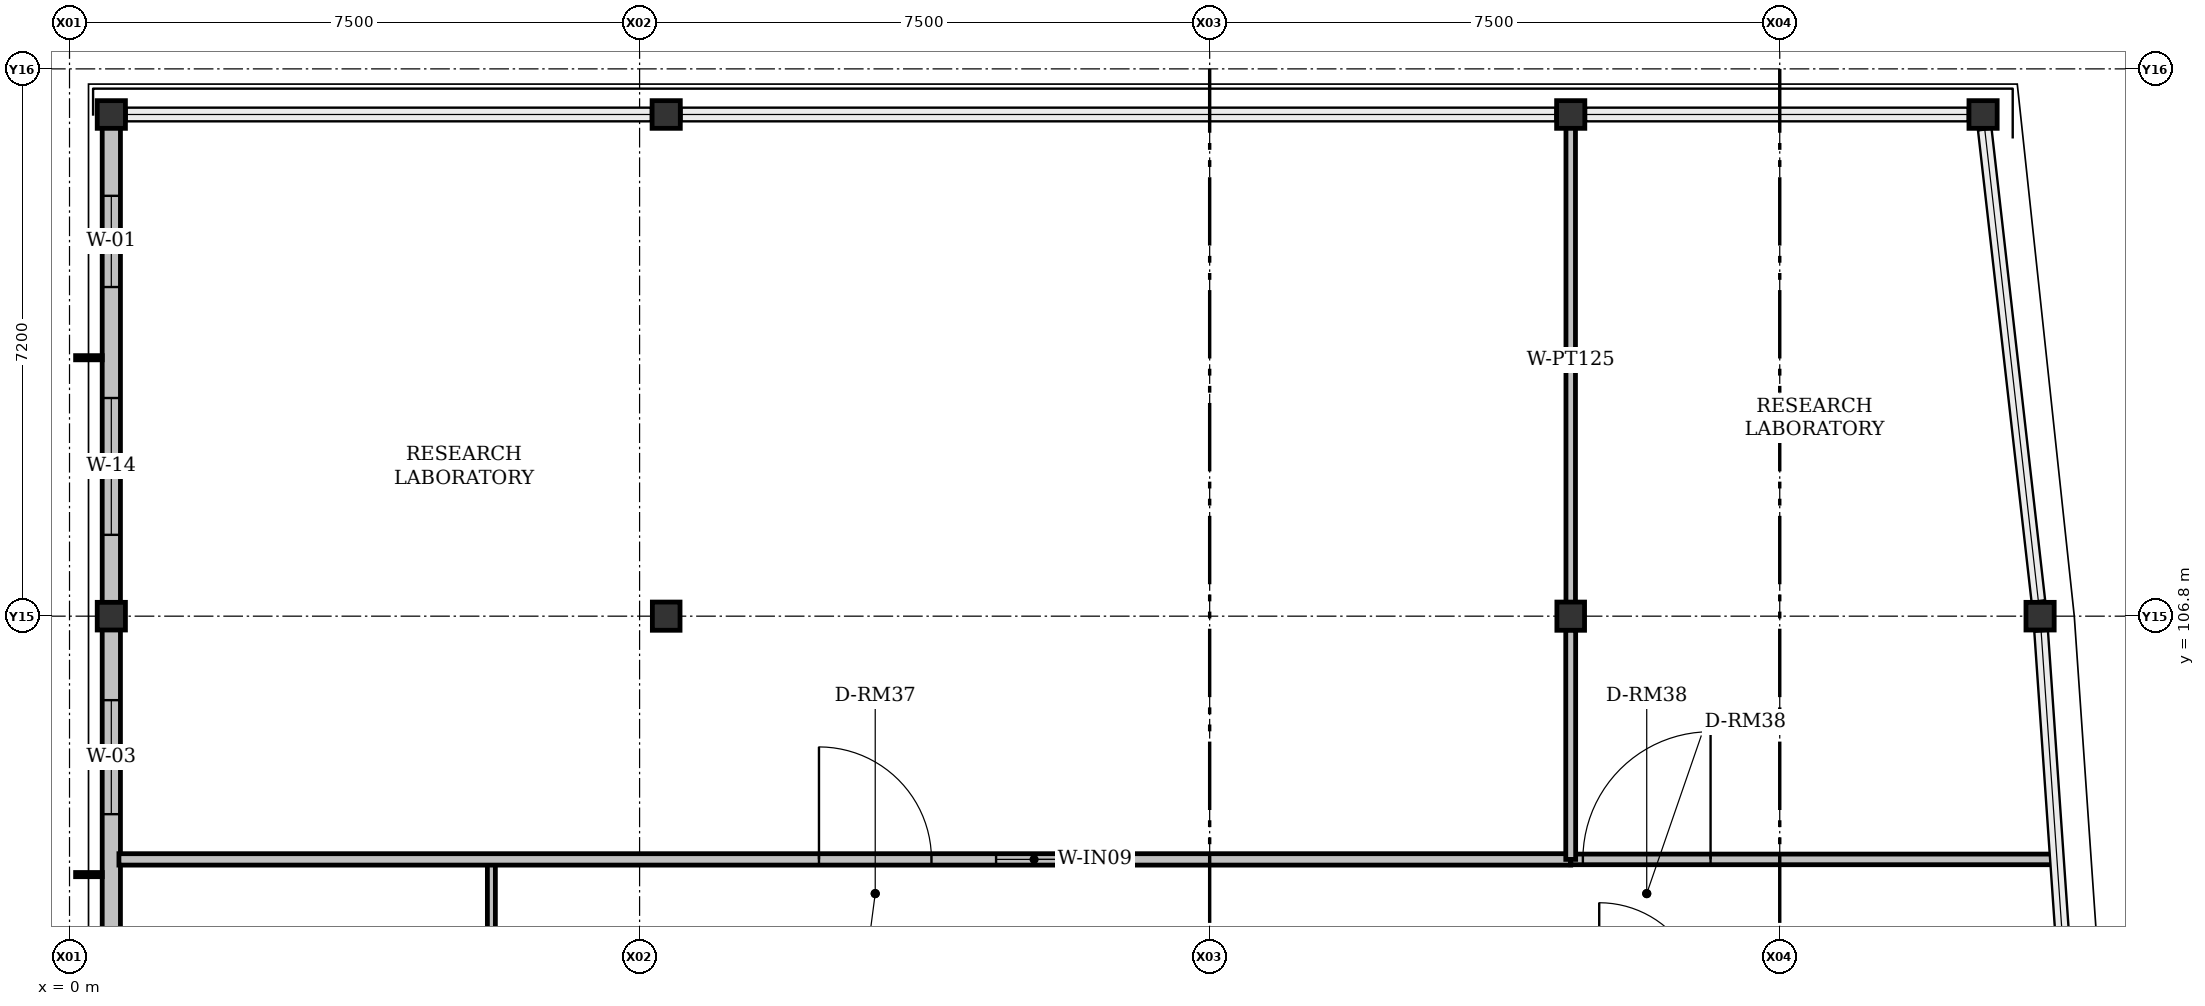
"""IFC4 building model, lengths in metres.
Left out: names, types, materials, properties, quantities, classifications, styles, units other than length and angle.
Written with IfcOpenShell. Run it as: python <this file> out.ifc"""

import sys

from ifc_helpers import new_model, si_unit, direction, frame, frame_2d, origin, origin_2d, place, context, subcontext, project, spatial, rectangle, i_section, extrude, element, fill, save


model = new_model("IFC4")
c1 = context("Model", 3, precision=1e-05, world=origin(), true_north=direction((0.0, 1.0)))
c2 = subcontext(c1, "Body", "Model", "MODEL_VIEW")
j1 = project(units=[si_unit("LENGTHUNIT", "METRE"), si_unit("PLANEANGLEUNIT", "RADIAN")], contexts=[c1])
p1 = place(None, origin())
s1 = spatial("IfcSite", under=j1, at=p1, CompositionType="ELEMENT")
p2 = place(p1, origin())
s2 = spatial("IfcBuilding", under=s1, at=p2, CompositionType="ELEMENT")
p3 = place(p2, frame((0.0, 0.0, 35.1)))
s3 = spatial("IfcBuildingStorey", under=s2, at=p3, CompositionType="ELEMENT", Elevation=35.1)
for number, where, z_axis, x_axis in (
    (1, (0.55, 106.8, 0.0), (0.0, 0.0, 1.0), (1.0, 0.0, 0.0)),
    (2, (7.85, 106.8, 0.0), (0.0, 0.0, 1.0), (0.0, 1.0, 0.0)),
    (3, (19.75, 106.8, 0.0), (0.0, 0.0, 1.0), (0.0, 1.0, 0.0)),
    (4, (25.925, 106.8, 0.0), (0.0, 0.0, 1.0), (1.0, 0.0, 0.0)),
    (5, (0.55, 113.4, 0.0), (0.0, 0.0, 1.0), (1.0, 0.0, 0.0)),
    (6, (7.85, 113.4, 0.0), (0.0, 0.0, 1.0), (1.0, 0.0, 0.0)),
    (7, (19.75, 113.4, 0.0), (0.0, 0.0, 1.0), (1.0, 0.0, 0.0)),
    (8, (25.175, 113.4, 0.0), (0.0, 0.0, 1.0), (1.0, 0.0, 0.0)),
):
    element("IfcColumn", number, at=place(p3, frame(where, z_axis=z_axis, x_axis=x_axis)), inside=s3, PredefinedType="COLUMN", context=c2, shape_type="SweptSolid", body=[
        extrude(i_section(OverallWidth=0.371, OverallDepth=0.364, WebThickness=0.013, FlangeThickness=0.022, FilletRadius=0.015, at=origin_2d()), origin(), (0.0, 0.0, 1.0), 4.2),
    ])
p4 = place(p3, frame((0.55, 99.6, 0.0), z_axis=(0.0, 0.0, 1.0), x_axis=(0.0, 1.0, 0.0)))
e9 = element("IfcWall", 9, at=p4, inside=s3, PredefinedType="SOLIDWALL", context=c2, shape_type="SweptSolid", body=[
    extrude(rectangle(XDim=7.2, YDim=0.24, at=frame_2d((3.6, 0.0))), origin(), (0.0, 0.0, 1.0), 3.577),
])
p5 = place(p4, frame((1.505, 0.0, 0.92)))
e10 = element("IfcOpeningElement", 10, at=p5, cuts=e9, PredefinedType="OPENING", context=c2, shape_type="SweptSolid", body=[
    extrude(rectangle(XDim=1.5, YDim=1.7, at=frame_2d((0.75, 0.85))), frame((0.0, 0.12, 0.0), z_axis=(0.0, -1.0, 0.0), x_axis=(1.0, 0.0, 0.0)), (0.0, 0.0, 1.0), 0.24),
])
p6 = place(p4, frame((4.595, 0.0, 0.92)))
e11 = element("IfcOpeningElement", 11, at=p6, cuts=e9, PredefinedType="OPENING", context=c2, shape_type="SweptSolid", body=[
    extrude(rectangle(XDim=1.5, YDim=1.4, at=frame_2d((0.75, 0.7))), frame((0.0, 0.12, 0.0), z_axis=(0.0, -1.0, 0.0), x_axis=(1.0, 0.0, 0.0)), (0.0, 0.0, 1.0), 0.24),
])
p7 = place(p3, frame((0.55, 106.8, 0.0), z_axis=(0.0, 0.0, 1.0), x_axis=(0.0, 1.0, 0.0)))
e12 = element("IfcWall", 12, at=p7, inside=s3, PredefinedType="SOLIDWALL", context=c2, shape_type="SweptSolid", body=[
    extrude(rectangle(XDim=6.6, YDim=0.24, at=frame_2d((3.3, 0.0))), origin(), (0.0, 0.0, 1.0), 3.577),
])
p8 = place(p7, frame((1.07, 0.0, 0.92)))
e13 = element("IfcOpeningElement", 13, at=p8, cuts=e12, PredefinedType="OPENING", context=c2, shape_type="SweptSolid", body=[
    extrude(rectangle(XDim=1.8, YDim=1.7, at=frame_2d((0.9, 0.85))), frame((0.0, 0.12, 0.0), z_axis=(0.0, -1.0, 0.0), x_axis=(1.0, 0.0, 0.0)), (0.0, 0.0, 1.0), 0.24),
])
p9 = place(p7, frame((4.33, 0.0, 0.92)))
e14 = element("IfcOpeningElement", 14, at=p9, cuts=e12, PredefinedType="OPENING", context=c2, shape_type="SweptSolid", body=[
    extrude(rectangle(XDim=1.2, YDim=1.4, at=frame_2d((0.6, 0.7))), frame((0.0, 0.12, 0.0), z_axis=(0.0, -1.0, 0.0), x_axis=(1.0, 0.0, 0.0)), (0.0, 0.0, 1.0), 0.24),
])
p10 = place(p3, frame((5.55, 85.2, 0.0), z_axis=(0.0, 0.0, 1.0), x_axis=(0.0, 1.0, 0.0)))
e15 = element("IfcWall", 15, at=p10, inside=s3, PredefinedType="PARTITIONING", context=c2, shape_type="SweptSolid", body=[
    extrude(rectangle(XDim=18.4, YDim=0.105, at=frame_2d((9.2, 0.0))), origin(), (0.0, 0.0, 1.0), 3.451),
])
p11 = place(p10, frame((8.54, 0.0, 0.0)))
e16 = element("IfcOpeningElement", 16, at=p11, cuts=e15, PredefinedType="OPENING", context=c2, shape_type="SweptSolid", body=[
    extrude(rectangle(XDim=1.32, YDim=2.18, at=frame_2d((0.66, 1.09))), frame((0.0, 0.052, 0.0), z_axis=(0.0, -1.0, 0.0), x_axis=(1.0, 0.0, 0.0)), (0.0, 0.0, 1.0), 0.105),
])
p12 = place(p10, frame((10.71, 0.0, 0.92)))
e17 = element("IfcOpeningElement", 17, at=p12, cuts=e15, PredefinedType="OPENING", context=c2, shape_type="SweptSolid", body=[
    extrude(rectangle(XDim=1.4, YDim=1.2, at=frame_2d((0.7, 0.6))), frame((0.0, 0.052, 0.0), z_axis=(0.0, -1.0, 0.0), x_axis=(1.0, 0.0, 0.0)), (0.0, 0.0, 1.0), 0.105),
])
p13 = place(p3, frame((0.65, 103.6, 0.0), z_axis=(0.0, 0.0, 1.0), x_axis=(1.0, 0.0, 0.0)))
e18 = element("IfcWall", 18, at=p13, inside=s3, PredefinedType="PARTITIONING", context=c2, shape_type="SweptSolid", body=[
    extrude(rectangle(XDim=19.1, YDim=0.15, at=frame_2d((9.55, 0.0))), origin(), (0.0, 0.0, 1.0), 3.527),
])
p14 = place(p13, frame((9.21, 0.0, 0.0)))
e19 = element("IfcOpeningElement", 19, at=p14, cuts=e18, PredefinedType="OPENING", context=c2, shape_type="SweptSolid", body=[
    extrude(rectangle(XDim=1.48, YDim=2.28, at=frame_2d((0.74, 1.14))), frame((0.0, 0.075, 0.0), z_axis=(0.0, -1.0, 0.0), x_axis=(1.0, 0.0, 0.0)), (0.0, 0.0, 1.0), 0.15),
])
p15 = place(p13, frame((11.54, 0.0, 0.92)))
e20 = element("IfcOpeningElement", 20, at=p15, cuts=e18, PredefinedType="OPENING", context=c2, shape_type="SweptSolid", body=[
    extrude(rectangle(XDim=1.0, YDim=1.3, at=frame_2d((0.5, 0.65))), frame((0.0, 0.075, 0.0), z_axis=(0.0, -1.0, 0.0), x_axis=(1.0, 0.0, 0.0)), (0.0, 0.0, 1.0), 0.15),
])
p16 = place(p3, frame((19.75, 103.6, 0.0), z_axis=(0.0, 0.0, 1.0), x_axis=(1.0, 0.0, 0.0)))
e21 = element("IfcWall", 21, at=p16, inside=s3, PredefinedType="PARTITIONING", context=c2, shape_type="SweptSolid", body=[
    extrude(rectangle(XDim=6.415, YDim=0.14, at=frame_2d((3.208, 0.0))), origin(), (0.0, 0.0, 1.0), 3.527),
])
p17 = place(p16, frame((0.16, 0.0, 0.0)))
e22 = element("IfcOpeningElement", 22, at=p17, cuts=e21, PredefinedType="OPENING", context=c2, shape_type="SweptSolid", body=[
    extrude(rectangle(XDim=1.68, YDim=2.35, at=frame_2d((0.84, 1.175))), frame((0.0, 0.07, 0.0), z_axis=(0.0, -1.0, 0.0), x_axis=(1.0, 0.0, 0.0)), (0.0, 0.0, 1.0), 0.14),
])
p18 = place(p3, frame((19.75, 106.619, 0.0), z_axis=(0.0, 0.0, 1.0), x_axis=(0.0, -1.0, 0.0)))
e23 = element("IfcWall", 23, at=p18, inside=s3, PredefinedType="PARTITIONING", context=c2, shape_type="SweptSolid", body=[
    extrude(rectangle(XDim=3.019, YDim=0.13, at=frame_2d((1.51, 0.0))), origin(), (0.0, 0.0, 1.0), 3.527),
])
p19 = place(p3, frame((19.75, 113.35, 0.0), z_axis=(0.0, 0.0, 1.0), x_axis=(0.0, -1.0, 0.0)))
e24 = element("IfcWall", 24, at=p19, inside=s3, PredefinedType="PARTITIONING", context=c2, shape_type="SweptSolid", body=[
    extrude(rectangle(XDim=6.37, YDim=0.125, at=frame_2d((3.185, 0.0))), origin(), (0.0, 0.0, 1.0), 3.527),
])
p20 = place(p6, origin())
e25 = element("IfcWindow", 25, at=p20, inside=s3, PartitioningType="SINGLE_PANEL", PredefinedType="WINDOW", context=c2, shape_type="SweptSolid", body=[
    extrude(rectangle(XDim=1.5, YDim=1.4, at=frame_2d((0.75, 0.7))), frame((0.0, 0.03, 0.0), z_axis=(0.0, -1.0, 0.0), x_axis=(1.0, 0.0, 0.0)), (0.0, 0.0, 1.0), 0.06),
])
fill(e11, e25)
p21 = place(p8, origin())
e26 = element("IfcWindow", 26, at=p21, inside=s3, PartitioningType="DOUBLE_PANEL_VERTICAL", PredefinedType="WINDOW", context=c2, shape_type="SweptSolid", body=[
    extrude(rectangle(XDim=1.8, YDim=1.7, at=frame_2d((0.9, 0.85))), frame((0.0, 0.03, 0.0), z_axis=(0.0, -1.0, 0.0), x_axis=(1.0, 0.0, 0.0)), (0.0, 0.0, 1.0), 0.06),
])
fill(e13, e26)
p22 = place(p9, origin())
e27 = element("IfcWindow", 27, at=p22, inside=s3, PartitioningType="SINGLE_PANEL", PredefinedType="WINDOW", context=c2, shape_type="SweptSolid", body=[
    extrude(rectangle(XDim=1.2, YDim=1.4, at=frame_2d((0.6, 0.7))), frame((0.0, 0.03, 0.0), z_axis=(0.0, -1.0, 0.0), x_axis=(1.0, 0.0, 0.0)), (0.0, 0.0, 1.0), 0.06),
])
fill(e14, e27)
p23 = place(p14, origin())
e28 = element("IfcDoor", 28, at=p23, inside=s3, OperationType="SINGLE_SWING_LEFT", PredefinedType="DOOR", context=c2, shape_type="SweptSolid", body=[
    extrude(rectangle(XDim=1.48, YDim=2.28, at=frame_2d((0.74, 1.14))), frame((0.0, 0.025, 0.0), z_axis=(0.0, -1.0, 0.0), x_axis=(1.0, 0.0, 0.0)), (0.0, 0.0, 1.0), 0.05),
])
fill(e19, e28)
p24 = place(p15, origin())
e29 = element("IfcWindow", 29, at=p24, inside=s3, PartitioningType="SINGLE_PANEL", PredefinedType="WINDOW", context=c2, shape_type="SweptSolid", body=[
    extrude(rectangle(XDim=1.0, YDim=1.3, at=frame_2d((0.5, 0.65))), frame((0.0, 0.03, 0.0), z_axis=(0.0, -1.0, 0.0), x_axis=(1.0, 0.0, 0.0)), (0.0, 0.0, 1.0), 0.06),
])
fill(e20, e29)
p25 = place(p17, origin())
e30 = element("IfcDoor", 30, at=p25, inside=s3, OperationType="SINGLE_SWING_RIGHT", PredefinedType="DOOR", context=c2, shape_type="SweptSolid", body=[
    extrude(rectangle(XDim=1.68, YDim=2.35, at=frame_2d((0.84, 1.175))), frame((0.0, 0.025, 0.0), z_axis=(0.0, -1.0, 0.0), x_axis=(1.0, 0.0, 0.0)), (0.0, 0.0, 1.0), 0.05),
])
fill(e22, e30)
save(model, sys.argv[1])
